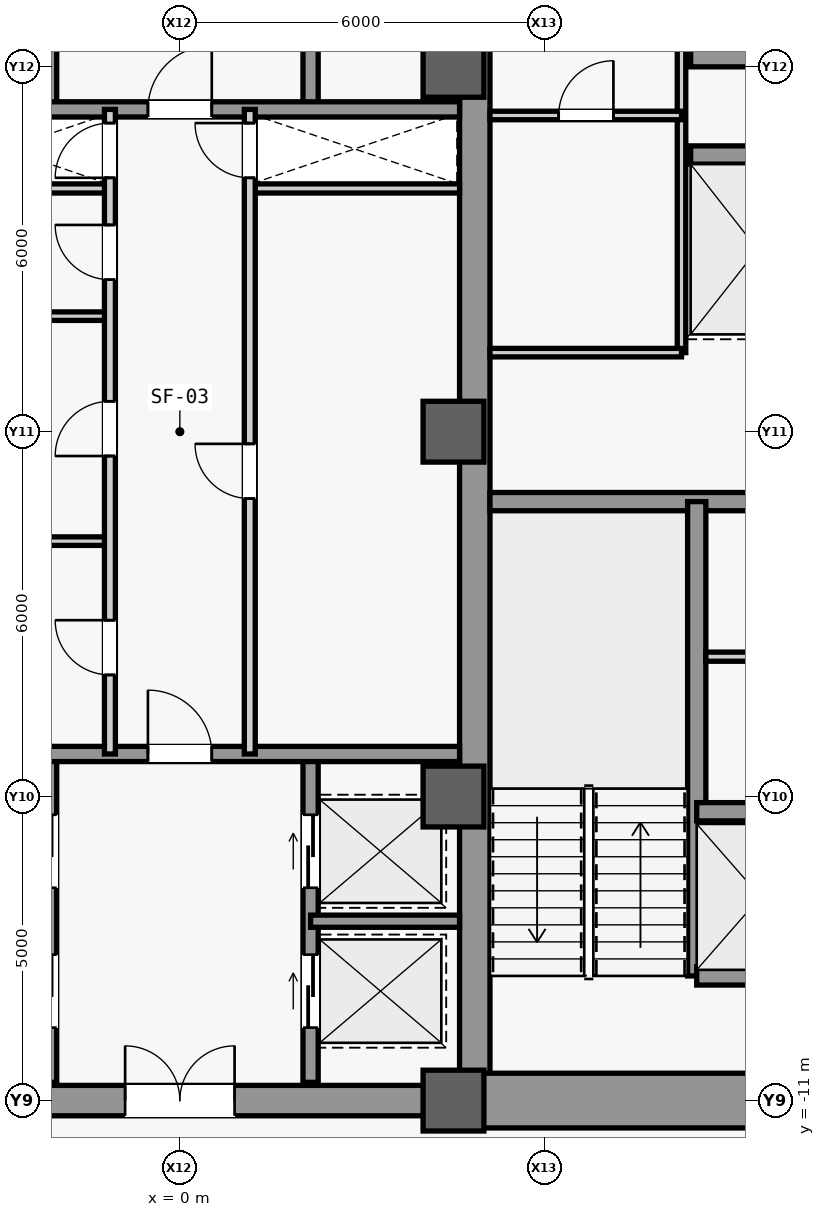
"""IFC4 building model, lengths in metres.
Left out: names, types, materials, properties, quantities, classifications, styles, units other than length and angle.
Written with IfcOpenShell. Run it as: python <this file> out.ifc"""

import sys

from ifc_helpers import new_model, si_unit, direction, frame, frame_2d, origin, origin_2d, place, context, subcontext, project, spatial, rectangle, extrude, source, transform, mapped, element, fill, save


model = new_model("IFC4")
c1 = context("Model", 3, precision=1e-05, world=origin(), true_north=direction((0.0, 1.0)))
c2 = subcontext(c1, "Body", "Model", "MODEL_VIEW")
j1 = project(units=[si_unit("LENGTHUNIT", "METRE"), si_unit("PLANEANGLEUNIT", "RADIAN")], contexts=[c1])
p1 = place(None, origin())
s1 = spatial("IfcSite", under=j1, at=p1, CompositionType="ELEMENT")
p2 = place(p1, origin())
s2 = spatial("IfcBuilding", under=s1, at=p2, CompositionType="ELEMENT")
p3 = place(p2, frame((0.0, 0.0, 87.2)))
s3 = spatial("IfcBuildingStorey", under=s2, at=p3, CompositionType="ELEMENT", Elevation=87.2)
m1 = source(origin(), c2, "Body", "SweptSolid", [
    extrude(rectangle(XDim=21.4, YDim=0.5, at=frame_2d((10.7, 0.0))), origin(), (0.0, 0.0, 1.0), 3.94),
])
p4 = place(p3, frame((4.85, -10.7, 0.0), z_axis=(0.0, 0.0, 1.0), x_axis=(0.0, 1.0, 0.0)))
e1 = element("IfcWall", 1, at=p4, inside=s3, PredefinedType="SHEAR", context=c2, shape_type="MappedRepresentation", body=[
    mapped(m1, transform((0.0, 0.0, 0.0), scale=1.0)),
])
m2 = source(origin(), c2, "Body", "SweptSolid", [
    extrude(rectangle(XDim=5.85, YDim=0.9, at=frame_2d((2.925, 0.0))), origin(), (0.0, 0.0, 1.0), 3.94),
])
p5 = place(p3, frame((4.85, -11.0, 0.0), z_axis=(0.0, 0.0, 1.0), x_axis=(1.0, 0.0, 0.0)))
e2 = element("IfcWall", 2, at=p5, inside=s3, PredefinedType="SHEAR", context=c2, shape_type="MappedRepresentation", body=[
    mapped(m2, transform((0.0, 0.0, 0.0), scale=1.0)),
])
m3 = source(origin(), c2, "Body", "SweptSolid", [
    extrude(rectangle(XDim=5.6, YDim=0.3, at=frame_2d((2.8, 0.0))), origin(), (0.0, 0.0, 1.0), 3.94),
])
p6 = place(p3, frame((5.1, -1.15, 0.0), z_axis=(0.0, 0.0, 1.0), x_axis=(1.0, 0.0, 0.0)))
e3 = element("IfcWall", 3, at=p6, inside=s3, PredefinedType="SHEAR", context=c2, shape_type="MappedRepresentation", body=[
    mapped(m3, transform((0.0, 0.0, 0.0), scale=1.0)),
])
m4 = source(origin(), c2, "Body", "SweptSolid", [
    extrude(rectangle(XDim=9.2, YDim=0.5, at=frame_2d((4.6, 0.0))), origin(), (0.0, 0.0, 1.0), 3.94),
])
p7 = place(p3, frame((-4.6, -11.0, 0.0), z_axis=(0.0, 0.0, 1.0), x_axis=(1.0, 0.0, 0.0)))
e4 = element("IfcWall", 4, at=p7, inside=s3, PredefinedType="SHEAR", context=c2, shape_type="MappedRepresentation", body=[
    mapped(m4, transform((0.0, 0.0, 0.0), scale=1.0)),
])
m5 = source(origin(), c2, "Body", "SweptSolid", [
    extrude(rectangle(XDim=1.8, YDim=2.25, at=frame_2d((0.9, 1.125))), frame((0.0, 0.26, 0.0), z_axis=(0.0, -1.0, 0.0), x_axis=(1.0, 0.0, 0.0)), (0.0, 0.0, 1.0), 0.52),
])
p8 = place(p7, frame((3.7, 0.0, 0.0)))
e5 = element("IfcOpeningElement", 5, at=p8, cuts=e4, PredefinedType="OPENING", context=c2, shape_type="MappedRepresentation", body=[
    mapped(m5, transform((0.0, 0.0, 0.0), scale=1.0)),
])
m6 = source(origin(), c2, "Body", "SweptSolid", [
    extrude(rectangle(XDim=1.0, YDim=1.0, at=origin_2d()), origin(), (0.0, 0.0, 1.0), 4.2),
])
for number, where, z_axis, x_axis in (
    (6, (4.5, -11.0, 0.0), (0.0, 0.0, 1.0), (1.0, 0.0, 0.0)),
    (7, (4.5, -6.0, 0.0), (0.0, 0.0, 1.0), (1.0, 0.0, 0.0)),
    (8, (4.5, 0.0, 0.0), (0.0, 0.0, 1.0), (1.0, 0.0, 0.0)),
    (9, (4.5, 6.0, 0.0), (0.0, 0.0, 1.0), (1.0, 0.0, 0.0)),
):
    element("IfcColumn", number, at=place(p3, frame(where, z_axis=z_axis, x_axis=x_axis)), inside=s3, PredefinedType="COLUMN", context=c2, shape_type="MappedRepresentation", body=[
        mapped(m6, transform((0.0, 0.0, 0.0), scale=1.0)),
    ])
m7 = source(origin(), c2, "Body", "SweptSolid", [
    extrude(rectangle(XDim=7.8, YDim=0.3, at=frame_2d((3.9, 0.0))), origin(), (0.0, 0.0, 1.0), 3.94),
])
p9 = place(p3, frame((8.5, -8.95, 0.0), z_axis=(0.0, 0.0, 1.0), x_axis=(0.0, 1.0, 0.0)))
e10 = element("IfcWall", 10, at=p9, inside=s3, PredefinedType="SHEAR", context=c2, shape_type="MappedRepresentation", body=[
    mapped(m7, transform((0.0, 0.0, 0.0), scale=1.0)),
])
m8 = source(origin(), c2, "Body", "SweptSolid", [
    extrude(rectangle(XDim=2.2, YDim=0.3, at=frame_2d((1.1, 0.0))), origin(), (0.0, 0.0, 1.0), 3.94),
])
for number, where, z_axis, x_axis in (
    (11, (8.5, -8.95, 0.0), (0.0, 0.0, 1.0), (1.0, 0.0, 0.0)),
    (12, (8.5, -6.25, 0.0), (0.0, 0.0, 1.0), (1.0, 0.0, 0.0)),
):
    element("IfcWall", number, at=place(p3, frame(where, z_axis=z_axis, x_axis=x_axis)), inside=s3, PredefinedType="SHEAR", context=c2, shape_type="MappedRepresentation", body=[
        mapped(m8, transform((0.0, 0.0, 0.0), scale=1.0)),
    ])
m9 = source(origin(), c2, "Body", "SweptSolid", [
    extrude(rectangle(XDim=2.3, YDim=0.3, at=frame_2d((1.15, 0.0))), origin(), (0.0, 0.0, 1.0), 3.94),
])
for number, where, z_axis, x_axis in (
    (13, (8.4, 4.55, 0.0), (0.0, 0.0, 1.0), (1.0, 0.0, 0.0)),
    (14, (8.4, 6.15, 0.0), (0.0, 0.0, 1.0), (1.0, 0.0, 0.0)),
):
    element("IfcWall", number, at=place(p3, frame(where, z_axis=z_axis, x_axis=x_axis)), inside=s3, PredefinedType="SHEAR", context=c2, shape_type="MappedRepresentation", body=[
        mapped(m9, transform((0.0, 0.0, 0.0), scale=1.0)),
    ])
m10 = source(origin(), c2, "Body", "SweptSolid", [
    extrude(rectangle(XDim=2.05, YDim=0.15, at=frame_2d((1.025, 0.0))), origin(), (0.0, 0.0, 1.0), 3.94),
])
p10 = place(p3, frame((8.65, -3.7, 0.0), z_axis=(0.0, 0.0, 1.0), x_axis=(1.0, 0.0, 0.0)))
e15 = element("IfcWall", 15, at=p10, inside=s3, PredefinedType="PARTITIONING", context=c2, shape_type="MappedRepresentation", body=[
    mapped(m10, transform((0.0, 0.0, 0.0), scale=1.0)),
])
m11 = source(origin(), c2, "Body", "SweptSolid", [
    extrude(rectangle(XDim=9.4, YDim=0.14, at=frame_2d((4.7, 0.0))), origin(), (0.0, 0.0, 1.0), 3.94),
])
p11 = place(p3, frame((8.25, 1.3, 0.0), z_axis=(0.0, 0.0, 1.0), x_axis=(0.0, 1.0, 0.0)))
e16 = element("IfcWall", 16, at=p11, inside=s3, PredefinedType="PARTITIONING", context=c2, shape_type="MappedRepresentation", body=[
    mapped(m11, transform((0.0, 0.0, 0.0), scale=1.0)),
])
m12 = source(origin(), c2, "Body", "SweptSolid", [
    extrude(rectangle(XDim=3.15, YDim=0.14, at=frame_2d((1.575, 0.0))), origin(), (0.0, 0.0, 1.0), 3.94),
])
p12 = place(p3, frame((5.1, 1.3, 0.0), z_axis=(0.0, 0.0, 1.0), x_axis=(1.0, 0.0, 0.0)))
e17 = element("IfcWall", 17, at=p12, inside=s3, PredefinedType="PARTITIONING", context=c2, shape_type="MappedRepresentation", body=[
    mapped(m12, transform((0.0, 0.0, 0.0), scale=1.0)),
])
p13 = place(p3, frame((5.1, 5.2, 0.0), z_axis=(0.0, 0.0, 1.0), x_axis=(1.0, 0.0, 0.0)))
e18 = element("IfcWall", 18, at=p13, inside=s3, PredefinedType="PARTITIONING", context=c2, shape_type="MappedRepresentation", body=[
    mapped(m12, transform((0.0, 0.0, 0.0), scale=1.0)),
])
m13 = source(origin(), c2, "Body", "SweptSolid", [
    extrude(rectangle(XDim=0.9, YDim=2.15, at=frame_2d((0.45, 1.075))), frame((0.0, 0.08, 0.0), z_axis=(0.0, -1.0, 0.0), x_axis=(1.0, 0.0, 0.0)), (0.0, 0.0, 1.0), 0.16),
])
p14 = place(p13, frame((1.13, 0.0, 0.0)))
e19 = element("IfcOpeningElement", 19, at=p14, cuts=e18, PredefinedType="OPENING", context=c2, shape_type="MappedRepresentation", body=[
    mapped(m13, transform((0.0, 0.0, 0.0), scale=1.0)),
])
m14 = source(origin(), c2, "Body", "SweptSolid", [
    extrude(rectangle(XDim=3.45, YDim=0.15, at=frame_2d((1.725, 0.0))), origin(), (0.0, 0.0, 1.0), 3.94),
])
for number, where, z_axis, x_axis in (
    (20, (-4.6, 4.0, 0.0), (0.0, 0.0, 1.0), (1.0, 0.0, 0.0)),
    (21, (1.15, 4.0, 0.0), (0.0, 0.0, 1.0), (1.0, 0.0, 0.0)),
):
    element("IfcWall", number, at=place(p3, frame(where, z_axis=z_axis, x_axis=x_axis)), inside=s3, PredefinedType="PARTITIONING", context=c2, shape_type="MappedRepresentation", body=[
        mapped(m14, transform((0.0, 0.0, 0.0), scale=1.0)),
    ])
m15 = source(origin(), c2, "Body", "SweptSolid", [
    extrude(rectangle(XDim=5.4, YDim=0.25, at=frame_2d((2.7, 0.0))), origin(), (0.0, 0.0, 1.0), 3.94),
])
p15 = place(p3, frame((-2.15, -10.7, 0.0), z_axis=(0.0, 0.0, 1.0), x_axis=(0.0, 1.0, 0.0)))
e22 = element("IfcWall", 22, at=p15, inside=s3, PredefinedType="SHEAR", context=c2, shape_type="MappedRepresentation", body=[
    mapped(m15, transform((0.0, 0.0, 0.0), scale=1.0)),
])
m16 = source(origin(), c2, "Body", "SweptSolid", [
    extrude(rectangle(XDim=1.2, YDim=2.3, at=frame_2d((0.6, 1.15))), frame((0.0, 0.135, 0.0), z_axis=(0.0, -1.0, 0.0), x_axis=(1.0, 0.0, 0.0)), (0.0, 0.0, 1.0), 0.27),
])
p16 = place(p15, frame((0.9, 0.0, 0.0)))
e23 = element("IfcOpeningElement", 23, at=p16, cuts=e22, PredefinedType="OPENING", context=c2, shape_type="MappedRepresentation", body=[
    mapped(m16, transform((0.0, 0.0, 0.0), scale=1.0)),
])
p17 = place(p15, frame((3.2, 0.0, 0.0)))
e24 = element("IfcOpeningElement", 24, at=p17, cuts=e22, PredefinedType="OPENING", context=c2, shape_type="MappedRepresentation", body=[
    mapped(m16, transform((0.0, 0.0, 0.0), scale=1.0)),
])
p18 = place(p3, frame((2.15, -10.7, 0.0), z_axis=(0.0, 0.0, 1.0), x_axis=(0.0, 1.0, 0.0)))
e25 = element("IfcWall", 25, at=p18, inside=s3, PredefinedType="SHEAR", context=c2, shape_type="MappedRepresentation", body=[
    mapped(m15, transform((0.0, 0.0, 0.0), scale=1.0)),
])
p19 = place(p18, frame((0.9, 0.0, 0.0)))
e26 = element("IfcOpeningElement", 26, at=p19, cuts=e25, PredefinedType="OPENING", context=c2, shape_type="MappedRepresentation", body=[
    mapped(m16, transform((0.0, 0.0, 0.0), scale=1.0)),
])
p20 = place(p18, frame((3.2, 0.0, 0.0)))
e27 = element("IfcOpeningElement", 27, at=p20, cuts=e25, PredefinedType="OPENING", context=c2, shape_type="MappedRepresentation", body=[
    mapped(m16, transform((0.0, 0.0, 0.0), scale=1.0)),
])
m17 = source(origin(), c2, "Body", "SweptSolid", [
    extrude(rectangle(XDim=2.45, YDim=0.2, at=frame_2d((1.225, 0.0))), origin(), (0.0, 0.0, 1.0), 3.94),
])
p21 = place(p3, frame((2.15, -8.05, 0.0), z_axis=(0.0, 0.0, 1.0), x_axis=(1.0, 0.0, 0.0)))
e28 = element("IfcWall", 28, at=p21, inside=s3, PredefinedType="SHEAR", context=c2, shape_type="MappedRepresentation", body=[
    mapped(m17, transform((0.0, 0.0, 0.0), scale=1.0)),
])
m18 = source(origin(), c2, "Body", "SweptSolid", [
    extrude(rectangle(XDim=9.2, YDim=0.25, at=frame_2d((4.6, 0.0))), origin(), (0.0, 0.0, 1.0), 3.94),
])
p22 = place(p3, frame((-4.6, -5.3, 0.0), z_axis=(0.0, 0.0, 1.0), x_axis=(1.0, 0.0, 0.0)))
e29 = element("IfcWall", 29, at=p22, inside=s3, PredefinedType="SHEAR", context=c2, shape_type="MappedRepresentation", body=[
    mapped(m18, transform((0.0, 0.0, 0.0), scale=1.0)),
])
m19 = source(origin(), c2, "Body", "SweptSolid", [
    extrude(rectangle(XDim=1.05, YDim=2.2, at=frame_2d((0.525, 1.1))), frame((0.0, 0.135, 0.0), z_axis=(0.0, -1.0, 0.0), x_axis=(1.0, 0.0, 0.0)), (0.0, 0.0, 1.0), 0.27),
])
p23 = place(p22, frame((4.075, 0.0, 0.0)))
e30 = element("IfcOpeningElement", 30, at=p23, cuts=e29, PredefinedType="OPENING", context=c2, shape_type="MappedRepresentation", body=[
    mapped(m19, transform((0.0, 0.0, 0.0), scale=1.0)),
])
for number, where, z_axis, x_axis in (
    (31, (-2.15, 5.3, 0.0), (0.0, 0.0, 1.0), (0.0, 1.0, 0.0)),
    (32, (2.15, 5.3, 0.0), (0.0, 0.0, 1.0), (0.0, 1.0, 0.0)),
):
    element("IfcWall", number, at=place(p3, frame(where, z_axis=z_axis, x_axis=x_axis)), inside=s3, PredefinedType="SHEAR", context=c2, shape_type="MappedRepresentation", body=[
        mapped(m15, transform((0.0, 0.0, 0.0), scale=1.0)),
    ])
p24 = place(p3, frame((-4.6, 5.3, 0.0), z_axis=(0.0, 0.0, 1.0), x_axis=(1.0, 0.0, 0.0)))
e33 = element("IfcWall", 33, at=p24, inside=s3, PredefinedType="SHEAR", context=c2, shape_type="MappedRepresentation", body=[
    mapped(m18, transform((0.0, 0.0, 0.0), scale=1.0)),
])
p25 = place(p24, frame((4.075, 0.0, 0.0)))
e34 = element("IfcOpeningElement", 34, at=p25, cuts=e33, PredefinedType="OPENING", context=c2, shape_type="MappedRepresentation", body=[
    mapped(m19, transform((0.0, 0.0, 0.0), scale=1.0)),
])
m20 = source(origin(), c2, "Body", "SweptSolid", [
    extrude(rectangle(XDim=3.45, YDim=0.14, at=frame_2d((1.725, 0.0))), origin(), (0.0, 0.0, 1.0), 3.94),
])
for number, where, z_axis, x_axis in (
    (35, (-4.6, -1.8, 0.0), (0.0, 0.0, 1.0), (1.0, 0.0, 0.0)),
    (36, (-4.6, 1.9, 0.0), (0.0, 0.0, 1.0), (1.0, 0.0, 0.0)),
):
    element("IfcWall", number, at=place(p3, frame(where, z_axis=z_axis, x_axis=x_axis)), inside=s3, PredefinedType="PARTITIONING", context=c2, shape_type="MappedRepresentation", body=[
        mapped(m20, transform((0.0, 0.0, 0.0), scale=1.0)),
    ])
m21 = source(origin(), c2, "Body", "SweptSolid", [
    extrude(rectangle(XDim=10.6, YDim=0.18, at=frame_2d((5.3, 0.0))), origin(), (0.0, 0.0, 1.0), 3.94),
])
p26 = place(p3, frame((-1.15, -5.3, 0.0), z_axis=(0.0, 0.0, 1.0), x_axis=(0.0, 1.0, 0.0)))
e37 = element("IfcWall", 37, at=p26, inside=s3, PredefinedType="PARTITIONING", context=c2, shape_type="MappedRepresentation", body=[
    mapped(m21, transform((0.0, 0.0, 0.0), scale=1.0)),
])
m22 = source(origin(), c2, "Body", "SweptSolid", [
    extrude(rectangle(XDim=0.9, YDim=2.15, at=frame_2d((0.45, 1.075))), frame((0.0, 0.1, 0.0), z_axis=(0.0, -1.0, 0.0), x_axis=(1.0, 0.0, 0.0)), (0.0, 0.0, 1.0), 0.2),
])
p27 = place(p26, frame((1.3, 0.0, 0.0)))
e38 = element("IfcOpeningElement", 38, at=p27, cuts=e37, PredefinedType="OPENING", context=c2, shape_type="MappedRepresentation", body=[
    mapped(m22, transform((0.0, 0.0, 0.0), scale=1.0)),
])
p28 = place(p26, frame((4.9, 0.0, 0.0)))
e39 = element("IfcOpeningElement", 39, at=p28, cuts=e37, PredefinedType="OPENING", context=c2, shape_type="MappedRepresentation", body=[
    mapped(m22, transform((0.0, 0.0, 0.0), scale=1.0)),
])
p29 = place(p26, frame((7.8, 0.0, 0.0)))
e40 = element("IfcOpeningElement", 40, at=p29, cuts=e37, PredefinedType="OPENING", context=c2, shape_type="MappedRepresentation", body=[
    mapped(m22, transform((0.0, 0.0, 0.0), scale=1.0)),
])
p30 = place(p26, frame((9.475, 0.0, 0.0)))
e41 = element("IfcOpeningElement", 41, at=p30, cuts=e37, PredefinedType="OPENING", context=c2, shape_type="MappedRepresentation", body=[
    mapped(m22, transform((0.0, 0.0, 0.0), scale=1.0)),
])
p31 = place(p3, frame((1.15, -5.3, 0.0), z_axis=(0.0, 0.0, 1.0), x_axis=(0.0, 1.0, 0.0)))
e42 = element("IfcWall", 42, at=p31, inside=s3, PredefinedType="PARTITIONING", context=c2, shape_type="MappedRepresentation", body=[
    mapped(m21, transform((0.0, 0.0, 0.0), scale=1.0)),
])
p32 = place(p31, frame((4.2, 0.0, 0.0)))
e43 = element("IfcOpeningElement", 43, at=p32, cuts=e42, PredefinedType="OPENING", context=c2, shape_type="MappedRepresentation", body=[
    mapped(m22, transform((0.0, 0.0, 0.0), scale=1.0)),
])
p33 = place(p31, frame((9.475, 0.0, 0.0)))
e44 = element("IfcOpeningElement", 44, at=p33, cuts=e42, PredefinedType="OPENING", context=c2, shape_type="MappedRepresentation", body=[
    mapped(m22, transform((0.0, 0.0, 0.0), scale=1.0)),
])
m23 = source(origin(), c2, "Body", "SweptSolid", [
    extrude(rectangle(XDim=0.9, YDim=2.15, at=frame_2d((0.45, 1.075))), frame((0.0, 0.025, 0.0), z_axis=(0.0, -1.0, 0.0), x_axis=(1.0, 0.0, 0.0)), (0.0, 0.0, 1.0), 0.05),
])
p34 = place(p14, origin())
e45 = element("IfcDoor", 45, at=p34, inside=s3, OperationType="SINGLE_SWING_RIGHT", PredefinedType="DOOR", context=c2, shape_type="MappedRepresentation", body=[
    mapped(m23, transform((0.0, 0.0, 0.0), scale=1.0)),
])
fill(e19, e45)
m24 = source(origin(), c2, "Body", "SweptSolid", [
    extrude(rectangle(XDim=1.05, YDim=2.2, at=frame_2d((0.525, 1.1))), frame((0.0, 0.025, 0.0), z_axis=(0.0, -1.0, 0.0), x_axis=(1.0, 0.0, 0.0)), (0.0, 0.0, 1.0), 0.05),
])
p35 = place(p23, origin())
e46 = element("IfcDoor", 46, at=p35, inside=s3, OperationType="SINGLE_SWING_LEFT", PredefinedType="DOOR", context=c2, shape_type="MappedRepresentation", body=[
    mapped(m24, transform((0.0, 0.0, 0.0), scale=1.0)),
])
fill(e30, e46)
m25 = source(origin(), c2, "Body", "SweptSolid", [
    extrude(rectangle(XDim=1.8, YDim=2.25, at=frame_2d((0.9, 1.125))), frame((0.0, 0.025, 0.0), z_axis=(0.0, -1.0, 0.0), x_axis=(1.0, 0.0, 0.0)), (0.0, 0.0, 1.0), 0.05),
])
p36 = place(p8, origin())
e47 = element("IfcDoor", 47, at=p36, inside=s3, OperationType="SINGLE_SWING_LEFT", PredefinedType="DOOR", context=c2, shape_type="MappedRepresentation", body=[
    mapped(m25, transform((0.0, 0.0, 0.0), scale=1.0)),
])
fill(e5, e47)
p37 = place(p25, origin())
e48 = element("IfcDoor", 48, at=p37, inside=s3, OperationType="SINGLE_SWING_RIGHT", PredefinedType="DOOR", context=c2, shape_type="MappedRepresentation", body=[
    mapped(m24, transform((0.0, 0.0, 0.0), scale=1.0)),
])
fill(e34, e48)
p38 = place(p27, origin())
e49 = element("IfcDoor", 49, at=p38, inside=s3, OperationType="SINGLE_SWING_RIGHT", PredefinedType="DOOR", context=c2, shape_type="MappedRepresentation", body=[
    mapped(m23, transform((0.0, 0.0, 0.0), scale=1.0)),
])
fill(e38, e49)
p39 = place(p28, origin())
e50 = element("IfcDoor", 50, at=p39, inside=s3, OperationType="SINGLE_SWING_LEFT", PredefinedType="DOOR", context=c2, shape_type="MappedRepresentation", body=[
    mapped(m23, transform((0.0, 0.0, 0.0), scale=1.0)),
])
fill(e39, e50)
p40 = place(p29, origin())
e51 = element("IfcDoor", 51, at=p40, inside=s3, OperationType="SINGLE_SWING_RIGHT", PredefinedType="DOOR", context=c2, shape_type="MappedRepresentation", body=[
    mapped(m23, transform((0.0, 0.0, 0.0), scale=1.0)),
])
fill(e40, e51)
p41 = place(p32, origin())
e52 = element("IfcDoor", 52, at=p41, inside=s3, OperationType="SINGLE_SWING_RIGHT", PredefinedType="DOOR", context=c2, shape_type="MappedRepresentation", body=[
    mapped(m23, transform((0.0, 0.0, 0.0), scale=1.0)),
])
fill(e43, e52)
p42 = place(p30, origin())
e53 = element("IfcDoor", 53, at=p42, inside=s3, OperationType="SINGLE_SWING_LEFT", PredefinedType="DOOR", context=c2, shape_type="MappedRepresentation", body=[
    mapped(m23, transform((0.0, 0.0, 0.0), scale=1.0)),
])
fill(e41, e53)
p43 = place(p33, origin())
e54 = element("IfcDoor", 54, at=p43, inside=s3, OperationType="SINGLE_SWING_RIGHT", PredefinedType="DOOR", context=c2, shape_type="MappedRepresentation", body=[
    mapped(m23, transform((0.0, 0.0, 0.0), scale=1.0)),
])
fill(e44, e54)
m26 = source(origin(), c2, "Body", "SweptSolid", [
    extrude(rectangle(XDim=1.2, YDim=2.3, at=frame_2d((0.6, 1.15))), frame((0.0, 0.025, 0.0), z_axis=(0.0, -1.0, 0.0), x_axis=(1.0, 0.0, 0.0)), (0.0, 0.0, 1.0), 0.05),
])
p44 = place(p19, origin())
e55 = element("IfcDoor", 55, at=p44, inside=s3, OperationType="SLIDING_TO_LEFT", PredefinedType="DOOR", context=c2, shape_type="MappedRepresentation", body=[
    mapped(m26, transform((0.0, 0.0, 0.0), scale=1.0)),
])
fill(e26, e55)
p45 = place(p20, origin())
e56 = element("IfcDoor", 56, at=p45, inside=s3, OperationType="SLIDING_TO_LEFT", PredefinedType="DOOR", context=c2, shape_type="MappedRepresentation", body=[
    mapped(m26, transform((0.0, 0.0, 0.0), scale=1.0)),
])
fill(e27, e56)
save(model, sys.argv[1])
